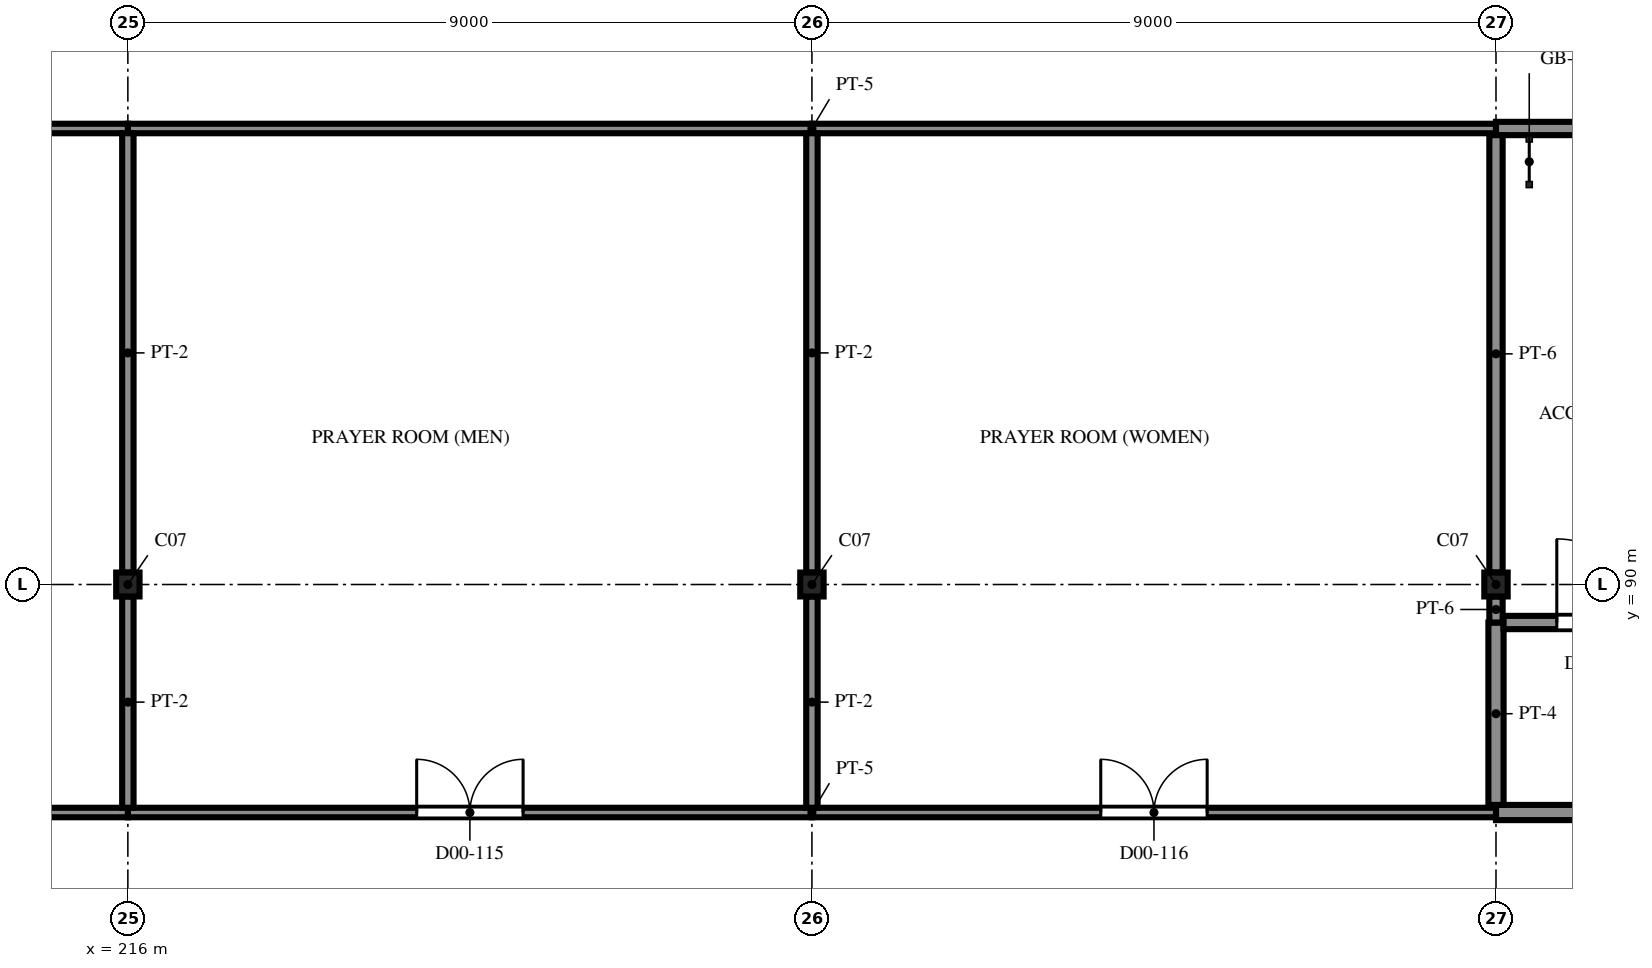
"""IFC4 building model, lengths in metres.
Left out: names, types, materials, properties, quantities, classifications, styles, units other than length and angle.
Written with IfcOpenShell. Run it as: python <this file> out.ifc"""

import sys

from ifc_helpers import new_model, si_unit, direction, frame, frame_2d, origin, origin_2d, place, context, subcontext, project, spatial, polyline, rectangle, i_section, outline, extrude, element, fill, save


model = new_model("IFC4")
c1 = context("Model", 3, precision=1e-05, world=origin(), true_north=direction((0.0, 1.0)))
c2 = subcontext(c1, "Body", "Model", "MODEL_VIEW")
j1 = project(units=[si_unit("LENGTHUNIT", "METRE"), si_unit("PLANEANGLEUNIT", "RADIAN")], contexts=[c1])
p1 = place(None, origin())
s1 = spatial("IfcSite", under=j1, at=p1, CompositionType="ELEMENT")
p2 = place(p1, origin())
s2 = spatial("IfcBuilding", under=s1, at=p2, CompositionType="ELEMENT")
p3 = place(p2, origin())
s3 = spatial("IfcBuildingStorey", under=s2, at=p3, CompositionType="ELEMENT", Elevation=0.0)
for number, where, z_axis, x_axis in (
    (1, (216.0, 90.0, -2.1), (0.0, 0.0, 1.0), (1.0, 0.0, 0.0)),
    (2, (225.0, 90.0, -2.1), (0.0, 0.0, 1.0), (1.0, 0.0, 0.0)),
    (3, (234.0, 90.0, -2.1), (0.0, 0.0, 1.0), (1.0, 0.0, 0.0)),
):
    element("IfcColumn", number, at=place(p3, frame(where, z_axis=z_axis, x_axis=x_axis)), inside=s3, PredefinedType="COLUMN", context=c2, shape_type="SweptSolid", body=[
        extrude(i_section(OverallWidth=0.307, OverallDepth=0.314, WebThickness=0.012, FlangeThickness=0.019, FilletRadius=0.015, at=origin_2d()), origin(), (0.0, 0.0, 1.0), 9.6),
    ])
for number, where, z_axis, x_axis in (
    (4, (234.0, 96.0, 0.0), (0.0, 0.0, 1.0), (-1.0, 0.0, 0.0)),
    (5, (225.0, 96.0, 0.0), (0.0, 0.0, 1.0), (-1.0, 0.0, 0.0)),
):
    element("IfcWall", number, at=place(p3, frame(where, z_axis=z_axis, x_axis=x_axis)), inside=s3, PredefinedType="PARTITIONING", context=c2, shape_type="SweptSolid", body=[
        extrude(rectangle(XDim=9.0, YDim=0.125, at=frame_2d((4.5, 0.0))), origin(), (0.0, 0.0, 1.0), 6.757),
    ])
p4 = place(p3, frame((216.0, 96.0, 0.0), z_axis=(0.0, 0.0, 1.0), x_axis=(-1.0, 0.0, 0.0)))
e6 = element("IfcWall", 6, at=p4, inside=s3, PredefinedType="PARTITIONING", context=c2, shape_type="SweptSolid", body=[
    extrude(rectangle(XDim=9.062, YDim=0.125, at=frame_2d((4.531, 0.0))), origin(), (0.0, 0.0, 1.0), 6.757),
])
p5 = place(p3, frame((236.7, 96.0, 0.0), z_axis=(0.0, 0.0, 1.0), x_axis=(-1.0, 0.0, 0.0)))
e7 = element("IfcWall", 7, at=p5, inside=s3, PredefinedType="PARTITIONING", context=c2, shape_type="SweptSolid", body=[
    extrude(rectangle(XDim=2.7, YDim=0.175, at=frame_2d((1.35, 0.0))), origin(), (0.0, 0.0, 1.0), 6.459),
])
p6 = place(p3, frame((234.0, 87.0, 0.0), z_axis=(0.0, 0.0, 1.0), x_axis=(1.0, 0.0, 0.0)))
e8 = element("IfcWall", 8, at=p6, inside=s3, PredefinedType="PARTITIONING", context=c2, shape_type="SweptSolid", body=[
    extrude(rectangle(XDim=8.858, YDim=0.2, at=frame_2d((4.429, 0.0))), origin(), (0.0, 0.0, 1.0), 6.6),
])
p7 = place(p6, frame((3.9, 0.0, 0.0)))
e9 = element("IfcOpeningElement", 9, at=p7, cuts=e8, PredefinedType="OPENING", context=c2, shape_type="SweptSolid", body=[
    extrude(rectangle(XDim=1.2, YDim=2.1, at=frame_2d((0.6, 1.05))), frame((0.0, 0.11, 0.0), z_axis=(0.0, -1.0, 0.0), x_axis=(1.0, 0.0, 0.0)), (0.0, 0.0, 1.0), 0.22),
])
p8 = place(p3, frame((225.0, 87.0, 0.0), z_axis=(0.0, 0.0, 1.0), x_axis=(1.0, 0.0, 0.0)))
e10 = element("IfcWall", 10, at=p8, inside=s3, PredefinedType="PARTITIONING", context=c2, shape_type="SweptSolid", body=[
    extrude(rectangle(XDim=9.0, YDim=0.125, at=frame_2d((4.5, 0.0))), origin(), (0.0, 0.0, 1.0), 6.757),
])
p9 = place(p8, frame((3.8, 0.0, 0.0)))
e11 = element("IfcOpeningElement", 11, at=p9, cuts=e10, PredefinedType="OPENING", context=c2, shape_type="SweptSolid", body=[
    extrude(rectangle(XDim=1.4, YDim=2.1, at=frame_2d((0.7, 1.05))), frame((0.0, 0.073, 0.0), z_axis=(0.0, -1.0, 0.0), x_axis=(1.0, 0.0, 0.0)), (0.0, 0.0, 1.0), 0.145),
])
p10 = place(p3, frame((216.0, 87.0, 0.0), z_axis=(0.0, 0.0, 1.0), x_axis=(1.0, 0.0, 0.0)))
e12 = element("IfcWall", 12, at=p10, inside=s3, PredefinedType="PARTITIONING", context=c2, shape_type="SweptSolid", body=[
    extrude(rectangle(XDim=9.0, YDim=0.125, at=frame_2d((4.5, 0.0))), origin(), (0.0, 0.0, 1.0), 6.757),
])
p11 = place(p10, frame((3.8, 0.0, 0.0)))
e13 = element("IfcOpeningElement", 13, at=p11, cuts=e12, PredefinedType="OPENING", context=c2, shape_type="SweptSolid", body=[
    extrude(rectangle(XDim=1.4, YDim=2.1, at=frame_2d((0.7, 1.05))), frame((0.0, 0.073, 0.0), z_axis=(0.0, -1.0, 0.0), x_axis=(1.0, 0.0, 0.0)), (0.0, 0.0, 1.0), 0.145),
])
p12 = place(p3, frame((206.938, 87.0, 0.0), z_axis=(0.0, 0.0, 1.0), x_axis=(1.0, 0.0, 0.0)))
e14 = element("IfcWall", 14, at=p12, inside=s3, PredefinedType="PARTITIONING", context=c2, shape_type="SweptSolid", body=[
    extrude(rectangle(XDim=9.062, YDim=0.125, at=frame_2d((4.531, 0.0))), origin(), (0.0, 0.0, 1.0), 6.757),
])
p13 = place(p12, frame((3.962, 0.0, 0.0)))
e15 = element("IfcOpeningElement", 15, at=p13, cuts=e14, PredefinedType="OPENING", context=c2, shape_type="SweptSolid", body=[
    extrude(rectangle(XDim=1.2, YDim=2.1, at=frame_2d((0.6, 1.05))), frame((0.0, 0.073, 0.0), z_axis=(0.0, -1.0, 0.0), x_axis=(1.0, 0.0, 0.0)), (0.0, 0.0, 1.0), 0.145),
])
p14 = place(p3, frame((216.0, 95.938, 0.0), z_axis=(0.0, 0.0, 1.0), x_axis=(0.0, -1.0, 0.0)))
e16 = element("IfcWall", 16, at=p14, inside=s3, PredefinedType="PARTITIONING", context=c2, shape_type="SweptSolid", body=[
    extrude(rectangle(XDim=5.78, YDim=0.15, at=frame_2d((2.89, 0.0))), origin(), (0.0, 0.0, 1.0), 6.6),
])
p15 = place(p3, frame((216.0, 89.843, 0.0), z_axis=(0.0, 0.0, 1.0), x_axis=(0.0, -1.0, 0.0)))
e17 = element("IfcWall", 17, at=p15, inside=s3, PredefinedType="PARTITIONING", context=c2, shape_type="SweptSolid", body=[
    extrude(rectangle(XDim=2.78, YDim=0.15, at=frame_2d((1.39, 0.0))), origin(), (0.0, 0.0, 1.0), 6.6),
])
p16 = place(p3, frame((225.0, 95.938, 0.0), z_axis=(0.0, 0.0, 1.0), x_axis=(0.0, -1.0, 0.0)))
e18 = element("IfcWall", 18, at=p16, inside=s3, PredefinedType="PARTITIONING", context=c2, shape_type="SweptSolid", body=[
    extrude(rectangle(XDim=5.78, YDim=0.15, at=frame_2d((2.89, 0.0))), origin(), (0.0, 0.0, 1.0), 6.6),
])
p17 = place(p3, frame((225.0, 89.843, 0.0), z_axis=(0.0, 0.0, 1.0), x_axis=(0.0, -1.0, 0.0)))
e19 = element("IfcWall", 19, at=p17, inside=s3, PredefinedType="PARTITIONING", context=c2, shape_type="SweptSolid", body=[
    extrude(rectangle(XDim=2.78, YDim=0.15, at=frame_2d((1.39, 0.0))), origin(), (0.0, 0.0, 1.0), 6.6),
])
p18 = place(p3, frame((234.0, 89.5, 0.0), z_axis=(0.0, 0.0, 1.0), x_axis=(0.0, -1.0, 0.0)))
e20 = element("IfcWall", 20, at=p18, inside=s3, PredefinedType="PARTITIONING", context=c2, shape_type="SweptSolid", body=[
    extrude(rectangle(XDim=2.4, YDim=0.2, at=frame_2d((1.2, 0.0))), origin(), (0.0, 0.0, 1.0), 6.6),
])
p19 = place(p3, frame((234.0, 95.913, 0.0), z_axis=(0.0, 0.0, 1.0), x_axis=(0.0, -1.0, 0.0)))
e21 = element("IfcWall", 21, at=p19, inside=s3, PredefinedType="PARTITIONING", context=c2, shape_type="SweptSolid", body=[
    extrude(rectangle(XDim=5.755, YDim=0.175, at=frame_2d((2.878, 0.0))), origin(), (0.0, 0.0, 1.0), 6.459),
])
p20 = place(p3, frame((234.0, 89.843, 0.0), z_axis=(0.0, 0.0, 1.0), x_axis=(0.0, -1.0, 0.0)))
e22 = element("IfcWall", 22, at=p20, inside=s3, PredefinedType="PARTITIONING", context=c2, shape_type="SweptSolid", body=[
    extrude(rectangle(XDim=0.343, YDim=0.175, at=frame_2d((0.171, 0.0))), origin(), (0.0, 0.0, 1.0), 6.459),
])
p21 = place(p3, frame((234.1, 89.5, 0.0), z_axis=(0.0, 0.0, 1.0), x_axis=(1.0, 0.0, 0.0)))
e23 = element("IfcWall", 23, at=p21, inside=s3, PredefinedType="PARTITIONING", context=c2, shape_type="SweptSolid", body=[
    extrude(rectangle(XDim=2.6, YDim=0.175, at=frame_2d((1.3, 0.0))), origin(), (0.0, 0.0, 1.0), 6.459),
])
p22 = place(p21, frame((0.7, 0.0, 0.0)))
e24 = element("IfcOpeningElement", 24, at=p22, cuts=e23, PredefinedType="OPENING", context=c2, shape_type="SweptSolid", body=[
    extrude(rectangle(XDim=1.1, YDim=2.1, at=frame_2d((0.55, 1.05))), frame((0.0, 0.097, 0.0), z_axis=(0.0, -1.0, 0.0), x_axis=(1.0, 0.0, 0.0)), (0.0, 0.0, 1.0), 0.195),
])
p23 = place(p11, origin())
e25 = element("IfcDoor", 25, at=p23, inside=s3, OperationType="DOUBLE_DOOR_SINGLE_SWING", PredefinedType="DOOR", context=c2, shape_type="SweptSolid", body=[
    extrude(outline(polyline([(0.0, 0.0), (0.07, 0.0), (0.07, 2.03), (1.33, 2.03), (1.33, 0.0), (1.4, 0.0), (1.4, 2.1), (0.0, 2.1), (0.0, 0.0)])), frame((0.0, 0.025, 0.0), z_axis=(0.0, -1.0, 0.0), x_axis=(1.0, 0.0, 0.0)), (0.0, 0.0, 1.0), 0.05),
    extrude(outline(polyline([(0.074, 0.01), (0.697, 0.01), (0.697, 2.026), (0.074, 2.026), (0.074, 0.01)]), holes=[polyline([(0.194, 0.16), (0.577, 0.16), (0.577, 1.01), (0.194, 1.01), (0.194, 0.16)]), polyline([(0.235, 1.16), (0.535, 1.16), (0.535, 1.76), (0.235, 1.76), (0.235, 1.16)])]), frame((0.0, 0.017, 0.0), z_axis=(0.0, -1.0, 0.0), x_axis=(1.0, 0.0, 0.0)), (0.0, 0.0, 1.0), 0.035),
    extrude(rectangle(XDim=0.383, YDim=0.85, at=frame_2d((0.385, 0.585))), frame((0.0, 0.009, 0.0), z_axis=(0.0, -1.0, 0.0), x_axis=(1.0, 0.0, 0.0)), (0.0, 0.0, 1.0), 0.017),
    extrude(rectangle(XDim=0.3, YDim=0.6, at=frame_2d((0.385, 1.46))), frame((0.0, 0.006, 0.0), z_axis=(0.0, -1.0, 0.0), x_axis=(1.0, 0.0, 0.0)), (0.0, 0.0, 1.0), 0.012),
    extrude(outline(polyline([(0.703, 0.01), (1.326, 0.01), (1.326, 2.026), (0.703, 2.026), (0.703, 0.01)]), holes=[polyline([(0.823, 0.16), (1.206, 0.16), (1.206, 1.01), (0.823, 1.01), (0.823, 0.16)]), polyline([(0.865, 1.16), (1.165, 1.16), (1.165, 1.76), (0.865, 1.76), (0.865, 1.16)])]), frame((0.0, 0.017, 0.0), z_axis=(0.0, -1.0, 0.0), x_axis=(1.0, 0.0, 0.0)), (0.0, 0.0, 1.0), 0.035),
    extrude(rectangle(XDim=0.383, YDim=0.85, at=frame_2d((1.014, 0.585))), frame((0.0, 0.009, 0.0), z_axis=(0.0, -1.0, 0.0), x_axis=(1.0, 0.0, 0.0)), (0.0, 0.0, 1.0), 0.017),
    extrude(rectangle(XDim=0.3, YDim=0.6, at=frame_2d((1.015, 1.46))), frame((0.0, 0.006, 0.0), z_axis=(0.0, -1.0, 0.0), x_axis=(1.0, 0.0, 0.0)), (0.0, 0.0, 1.0), 0.012),
])
fill(e13, e25)
p24 = place(p9, origin())
e26 = element("IfcDoor", 26, at=p24, inside=s3, OperationType="DOUBLE_DOOR_SINGLE_SWING", PredefinedType="DOOR", context=c2, shape_type="SweptSolid", body=[
    extrude(outline(polyline([(0.0, 0.0), (0.07, 0.0), (0.07, 2.03), (1.33, 2.03), (1.33, 0.0), (1.4, 0.0), (1.4, 2.1), (0.0, 2.1), (0.0, 0.0)])), frame((0.0, 0.025, 0.0), z_axis=(0.0, -1.0, 0.0), x_axis=(1.0, 0.0, 0.0)), (0.0, 0.0, 1.0), 0.05),
    extrude(outline(polyline([(0.074, 0.01), (0.697, 0.01), (0.697, 2.026), (0.074, 2.026), (0.074, 0.01)]), holes=[polyline([(0.194, 0.16), (0.577, 0.16), (0.577, 1.01), (0.194, 1.01), (0.194, 0.16)]), polyline([(0.235, 1.16), (0.535, 1.16), (0.535, 1.76), (0.235, 1.76), (0.235, 1.16)])]), frame((0.0, 0.017, 0.0), z_axis=(0.0, -1.0, 0.0), x_axis=(1.0, 0.0, 0.0)), (0.0, 0.0, 1.0), 0.035),
    extrude(rectangle(XDim=0.383, YDim=0.85, at=frame_2d((0.385, 0.585))), frame((0.0, 0.009, 0.0), z_axis=(0.0, -1.0, 0.0), x_axis=(1.0, 0.0, 0.0)), (0.0, 0.0, 1.0), 0.017),
    extrude(rectangle(XDim=0.3, YDim=0.6, at=frame_2d((0.385, 1.46))), frame((0.0, 0.006, 0.0), z_axis=(0.0, -1.0, 0.0), x_axis=(1.0, 0.0, 0.0)), (0.0, 0.0, 1.0), 0.012),
    extrude(outline(polyline([(0.703, 0.01), (1.326, 0.01), (1.326, 2.026), (0.703, 2.026), (0.703, 0.01)]), holes=[polyline([(0.823, 0.16), (1.206, 0.16), (1.206, 1.01), (0.823, 1.01), (0.823, 0.16)]), polyline([(0.865, 1.16), (1.165, 1.16), (1.165, 1.76), (0.865, 1.76), (0.865, 1.16)])]), frame((0.0, 0.017, 0.0), z_axis=(0.0, -1.0, 0.0), x_axis=(1.0, 0.0, 0.0)), (0.0, 0.0, 1.0), 0.035),
    extrude(rectangle(XDim=0.383, YDim=0.85, at=frame_2d((1.014, 0.585))), frame((0.0, 0.009, 0.0), z_axis=(0.0, -1.0, 0.0), x_axis=(1.0, 0.0, 0.0)), (0.0, 0.0, 1.0), 0.017),
    extrude(rectangle(XDim=0.3, YDim=0.6, at=frame_2d((1.015, 1.46))), frame((0.0, 0.006, 0.0), z_axis=(0.0, -1.0, 0.0), x_axis=(1.0, 0.0, 0.0)), (0.0, 0.0, 1.0), 0.012),
])
fill(e11, e26)
p25 = place(p22, origin())
e27 = element("IfcDoor", 27, at=p25, inside=s3, OperationType="SINGLE_SWING_LEFT", PredefinedType="DOOR", context=c2, shape_type="SweptSolid", body=[
    extrude(outline(polyline([(0.0, 0.0), (0.07, 0.0), (0.07, 2.03), (1.03, 2.03), (1.03, 0.0), (1.1, 0.0), (1.1, 2.1), (0.0, 2.1), (0.0, 0.0)])), frame((0.0, 0.025, 0.0), z_axis=(0.0, -1.0, 0.0), x_axis=(1.0, 0.0, 0.0)), (0.0, 0.0, 1.0), 0.05),
    extrude(outline(polyline([(0.074, 0.01), (1.026, 0.01), (1.026, 2.026), (0.074, 2.026), (0.074, 0.01)]), holes=[polyline([(0.194, 0.16), (0.906, 0.16), (0.906, 1.01), (0.194, 1.01), (0.194, 0.16)]), polyline([(0.4, 1.16), (0.7, 1.16), (0.7, 1.76), (0.4, 1.76), (0.4, 1.16)])]), frame((0.0, 0.017, 0.0), z_axis=(0.0, -1.0, 0.0), x_axis=(1.0, 0.0, 0.0)), (0.0, 0.0, 1.0), 0.035),
    extrude(rectangle(XDim=0.712, YDim=0.85, at=frame_2d((0.55, 0.585))), frame((0.0, 0.009, 0.0), z_axis=(0.0, -1.0, 0.0), x_axis=(1.0, 0.0, 0.0)), (0.0, 0.0, 1.0), 0.017),
    extrude(rectangle(XDim=0.3, YDim=0.6, at=frame_2d((0.55, 1.46))), frame((0.0, 0.006, 0.0), z_axis=(0.0, -1.0, 0.0), x_axis=(1.0, 0.0, 0.0)), (0.0, 0.0, 1.0), 0.012),
])
fill(e24, e27)
save(model, sys.argv[1])
